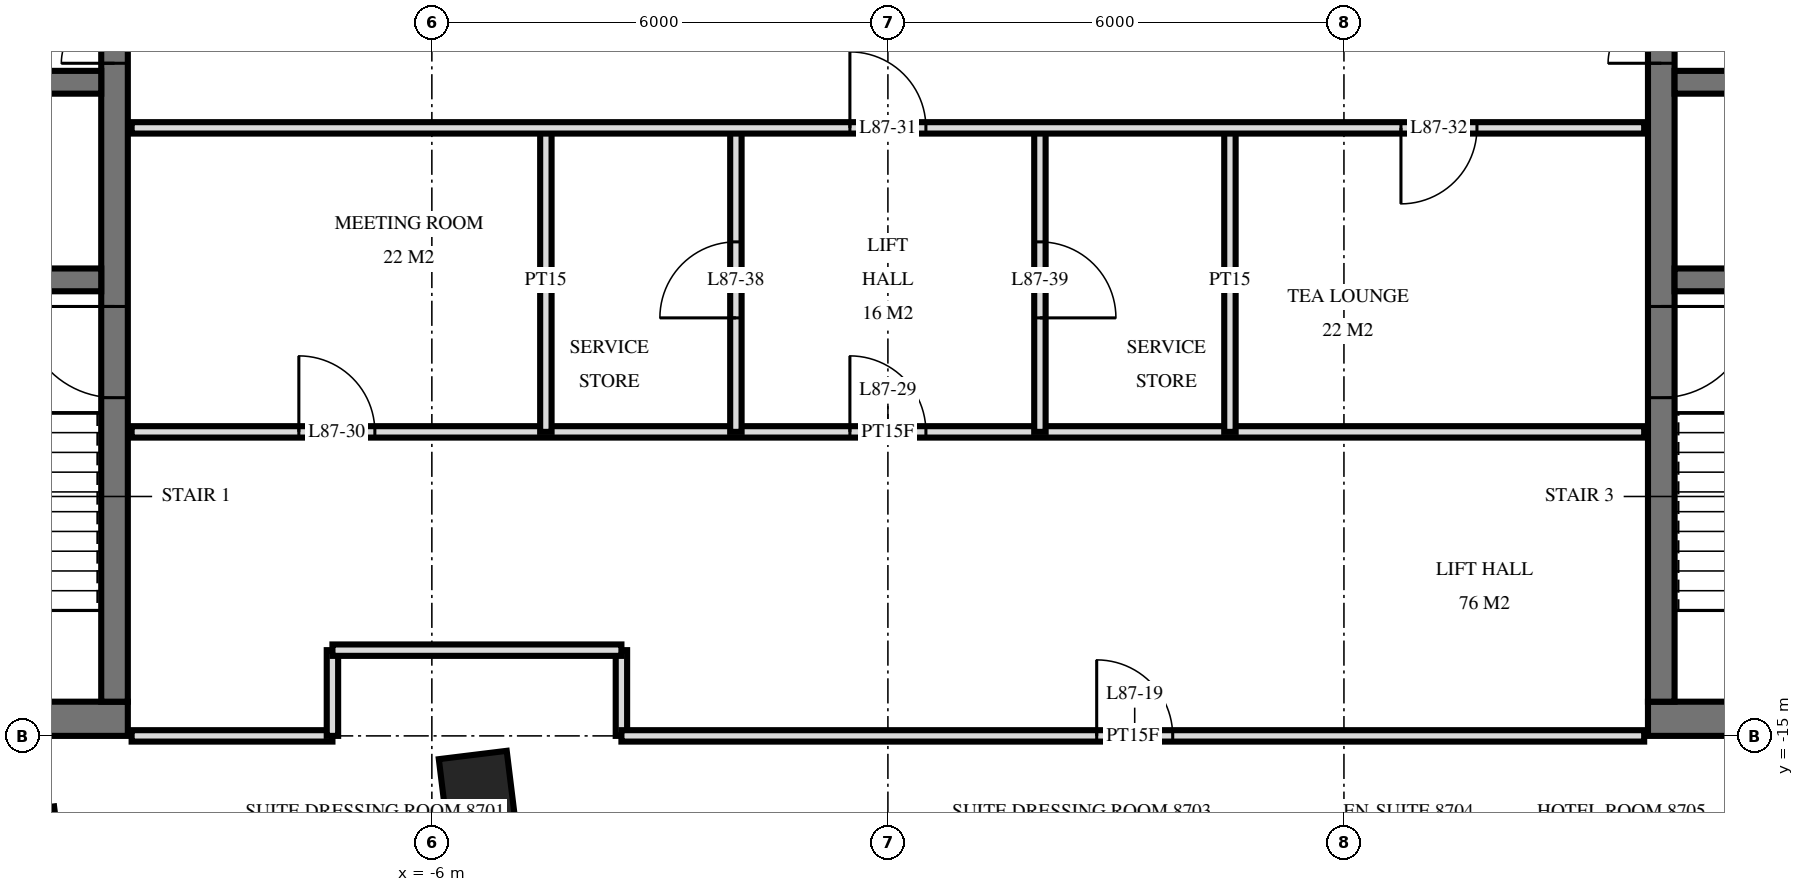
"""IFC4 building model, lengths in metres.
Left out: names, types, materials, properties, quantities, classifications, styles, units other than length and angle.
Written with IfcOpenShell. Run it as: python <this file> out.ifc"""

import sys

from ifc_helpers import new_model, si_unit, direction, frame, frame_2d, origin, origin_2d, place, context, subcontext, project, spatial, rectangle, extrude, element, fill, save


model = new_model("IFC4")
c1 = context("Model", 3, precision=1e-05, world=origin(), true_north=direction((0.0, 1.0)))
c2 = subcontext(c1, "Body", "Model", "MODEL_VIEW")
j1 = project(units=[si_unit("LENGTHUNIT", "METRE"), si_unit("PLANEANGLEUNIT", "RADIAN")], contexts=[c1])
p1 = place(None, origin())
s1 = spatial("IfcSite", under=j1, at=p1, CompositionType="ELEMENT")
p2 = place(p1, origin())
s2 = spatial("IfcBuilding", under=s1, at=p2, CompositionType="ELEMENT")
p3 = place(p2, frame((0.0, 0.0, 330.6)))
s3 = spatial("IfcBuildingStorey", under=s2, at=p3, CompositionType="ELEMENT", Elevation=330.6)
for number, where, z_axis, x_axis in (
    (1, (-11.362, -16.429, 0.0), (0.0, 0.0, 1.0), (0.993, 0.122, 0.0)),
    (2, (-5.407, -15.698, 0.0), (0.0, 0.0, 1.0), (0.993, 0.122, 0.0)),
):
    element("IfcColumn", number, at=place(p3, frame(where, z_axis=z_axis, x_axis=x_axis)), inside=s3, PredefinedType="COLUMN", context=c2, shape_type="SweptSolid", body=[
        extrude(rectangle(XDim=0.9, YDim=0.9, at=origin_2d()), origin(), (0.0, 0.0, 1.0), 4.0),
    ])
p4 = place(p3, frame((-19.5, -14.775, 0.0), z_axis=(0.0, 0.0, 1.0), x_axis=(1.0, 0.0, 0.0)))
e3 = element("IfcWall", 3, at=p4, inside=s3, PredefinedType="SHEAR", context=c2, shape_type="SweptSolid", body=[
    extrude(rectangle(XDim=9.5, YDim=0.45, at=frame_2d((4.75, 0.0))), origin(), (0.0, 0.0, 1.0), 4.0),
])
p5 = place(p4, frame((1.2, 0.0, 0.0)))
e4 = element("IfcOpeningElement", 4, at=p5, cuts=e3, PredefinedType="OPENING", context=c2, shape_type="SweptSolid", body=[
    extrude(rectangle(XDim=1.2, YDim=2.1, at=frame_2d((0.6, 1.05))), frame((0.0, 0.235, 0.0), z_axis=(0.0, -1.0, 0.0), x_axis=(1.0, 0.0, 0.0)), (0.0, 0.0, 1.0), 0.47),
])
p6 = place(p4, frame((4.25, 0.0, 0.0)))
e5 = element("IfcOpeningElement", 5, at=p6, cuts=e3, PredefinedType="OPENING", context=c2, shape_type="SweptSolid", body=[
    extrude(rectangle(XDim=1.1, YDim=2.1, at=frame_2d((0.55, 1.05))), frame((0.0, 0.235, 0.0), z_axis=(0.0, -1.0, 0.0), x_axis=(1.0, 0.0, 0.0)), (0.0, 0.0, 1.0), 0.47),
])
p7 = place(p3, frame((-10.175, -14.55, 0.0), z_axis=(0.0, 0.0, 1.0), x_axis=(0.0, 1.0, 0.0)))
e6 = element("IfcWall", 6, at=p7, inside=s3, PredefinedType="SHEAR", context=c2, shape_type="SweptSolid", body=[
    extrude(rectangle(XDim=14.1, YDim=0.35, at=frame_2d((7.05, 0.0))), origin(), (0.0, 0.0, 1.0), 4.0),
])
p8 = place(p7, frame((8.4, 0.0, 0.0)))
e7 = element("IfcOpeningElement", 7, at=p8, cuts=e6, PredefinedType="OPENING", context=c2, shape_type="SweptSolid", body=[
    extrude(rectangle(XDim=1.4, YDim=2.4, at=frame_2d((0.7, 1.2))), frame((0.0, 0.185, 0.0), z_axis=(0.0, -1.0, 0.0), x_axis=(1.0, 0.0, 0.0)), (0.0, 0.0, 1.0), 0.37),
])
p9 = place(p7, frame((10.0, 0.0, 0.0)))
e8 = element("IfcOpeningElement", 8, at=p9, cuts=e6, PredefinedType="OPENING", context=c2, shape_type="SweptSolid", body=[
    extrude(rectangle(XDim=1.4, YDim=2.4, at=frame_2d((0.7, 1.2))), frame((0.0, 0.185, 0.0), z_axis=(0.0, -1.0, 0.0), x_axis=(1.0, 0.0, 0.0)), (0.0, 0.0, 1.0), 0.37),
])
p10 = place(p7, frame((4.0, 0.0, 0.0)))
e9 = element("IfcOpeningElement", 9, at=p10, cuts=e6, PredefinedType="OPENING", context=c2, shape_type="SweptSolid", body=[
    extrude(rectangle(XDim=1.2, YDim=2.1, at=frame_2d((0.6, 1.05))), frame((0.0, 0.185, 0.0), z_axis=(0.0, -1.0, 0.0), x_axis=(1.0, 0.0, 0.0)), (0.0, 0.0, 1.0), 0.37),
])
p11 = place(p3, frame((-19.05, -6.4, 0.0), z_axis=(0.0, 0.0, 1.0), x_axis=(1.0, 0.0, 0.0)))
e10 = element("IfcWall", 10, at=p11, inside=s3, PredefinedType="SHEAR", context=c2, shape_type="SweptSolid", body=[
    extrude(rectangle(XDim=8.7, YDim=0.3, at=frame_2d((4.35, 0.0))), origin(), (0.0, 0.0, 1.0), 4.0),
])
p12 = place(p11, frame((0.8, 0.0, 0.0)))
e11 = element("IfcOpeningElement", 11, at=p12, cuts=e10, PredefinedType="OPENING", context=c2, shape_type="SweptSolid", body=[
    extrude(rectangle(XDim=1.1, YDim=2.1, at=frame_2d((0.55, 1.05))), frame((0.0, 0.16, 0.0), z_axis=(0.0, -1.0, 0.0), x_axis=(1.0, 0.0, 0.0)), (0.0, 0.0, 1.0), 0.32),
])
p13 = place(p3, frame((-19.05, -9.0, 0.0), z_axis=(0.0, 0.0, 1.0), x_axis=(1.0, 0.0, 0.0)))
e12 = element("IfcWall", 12, at=p13, inside=s3, PredefinedType="SHEAR", context=c2, shape_type="SweptSolid", body=[
    extrude(rectangle(XDim=8.7, YDim=0.3, at=frame_2d((4.35, 0.0))), origin(), (0.0, 0.0, 1.0), 4.0),
])
p14 = place(p13, frame((3.8, 0.0, 0.0)))
e13 = element("IfcOpeningElement", 13, at=p14, cuts=e12, PredefinedType="OPENING", context=c2, shape_type="SweptSolid", body=[
    extrude(rectangle(XDim=1.1, YDim=2.1, at=frame_2d((0.55, 1.05))), frame((0.0, 0.16, 0.0), z_axis=(0.0, -1.0, 0.0), x_axis=(1.0, 0.0, 0.0)), (0.0, 0.0, 1.0), 0.32),
])
p15 = place(p3, frame((10.0, -14.775, 0.0), z_axis=(0.0, 0.0, 1.0), x_axis=(1.0, 0.0, 0.0)))
e14 = element("IfcWall", 14, at=p15, inside=s3, PredefinedType="SHEAR", context=c2, shape_type="SweptSolid", body=[
    extrude(rectangle(XDim=9.5, YDim=0.45, at=frame_2d((4.75, 0.0))), origin(), (0.0, 0.0, 1.0), 4.0),
])
p16 = place(p15, frame((7.1, 0.0, 0.0)))
e15 = element("IfcOpeningElement", 15, at=p16, cuts=e14, PredefinedType="OPENING", context=c2, shape_type="SweptSolid", body=[
    extrude(rectangle(XDim=1.2, YDim=2.1, at=frame_2d((0.6, 1.05))), frame((0.0, 0.235, 0.0), z_axis=(0.0, -1.0, 0.0), x_axis=(1.0, 0.0, 0.0)), (0.0, 0.0, 1.0), 0.47),
])
p17 = place(p15, frame((4.15, 0.0, 0.0)))
e16 = element("IfcOpeningElement", 16, at=p17, cuts=e14, PredefinedType="OPENING", context=c2, shape_type="SweptSolid", body=[
    extrude(rectangle(XDim=1.1, YDim=2.1, at=frame_2d((0.55, 1.05))), frame((0.0, 0.235, 0.0), z_axis=(0.0, -1.0, 0.0), x_axis=(1.0, 0.0, 0.0)), (0.0, 0.0, 1.0), 0.47),
])
p18 = place(p3, frame((10.175, -14.55, 0.0), z_axis=(0.0, 0.0, 1.0), x_axis=(0.0, 1.0, 0.0)))
e17 = element("IfcWall", 17, at=p18, inside=s3, PredefinedType="SHEAR", context=c2, shape_type="SweptSolid", body=[
    extrude(rectangle(XDim=14.1, YDim=0.35, at=frame_2d((7.05, 0.0))), origin(), (0.0, 0.0, 1.0), 4.0),
])
p19 = place(p18, frame((8.4, 0.0, 0.0)))
e18 = element("IfcOpeningElement", 18, at=p19, cuts=e17, PredefinedType="OPENING", context=c2, shape_type="SweptSolid", body=[
    extrude(rectangle(XDim=1.4, YDim=2.4, at=frame_2d((0.7, 1.2))), frame((0.0, 0.185, 0.0), z_axis=(0.0, -1.0, 0.0), x_axis=(1.0, 0.0, 0.0)), (0.0, 0.0, 1.0), 0.37),
])
p20 = place(p18, frame((10.0, 0.0, 0.0)))
e19 = element("IfcOpeningElement", 19, at=p20, cuts=e17, PredefinedType="OPENING", context=c2, shape_type="SweptSolid", body=[
    extrude(rectangle(XDim=1.4, YDim=2.4, at=frame_2d((0.7, 1.2))), frame((0.0, 0.185, 0.0), z_axis=(0.0, -1.0, 0.0), x_axis=(1.0, 0.0, 0.0)), (0.0, 0.0, 1.0), 0.37),
])
p21 = place(p18, frame((4.0, 0.0, 0.0)))
e20 = element("IfcOpeningElement", 20, at=p21, cuts=e17, PredefinedType="OPENING", context=c2, shape_type="SweptSolid", body=[
    extrude(rectangle(XDim=1.2, YDim=2.1, at=frame_2d((0.6, 1.05))), frame((0.0, 0.185, 0.0), z_axis=(0.0, -1.0, 0.0), x_axis=(1.0, 0.0, 0.0)), (0.0, 0.0, 1.0), 0.37),
])
p22 = place(p3, frame((10.35, -6.4, 0.0), z_axis=(0.0, 0.0, 1.0), x_axis=(1.0, 0.0, 0.0)))
e21 = element("IfcWall", 21, at=p22, inside=s3, PredefinedType="SHEAR", context=c2, shape_type="SweptSolid", body=[
    extrude(rectangle(XDim=8.7, YDim=0.3, at=frame_2d((4.35, 0.0))), origin(), (0.0, 0.0, 1.0), 4.0),
])
p23 = place(p22, frame((6.8, 0.0, 0.0)))
e22 = element("IfcOpeningElement", 22, at=p23, cuts=e21, PredefinedType="OPENING", context=c2, shape_type="SweptSolid", body=[
    extrude(rectangle(XDim=1.1, YDim=2.1, at=frame_2d((0.55, 1.05))), frame((0.0, 0.16, 0.0), z_axis=(0.0, -1.0, 0.0), x_axis=(1.0, 0.0, 0.0)), (0.0, 0.0, 1.0), 0.32),
])
p24 = place(p3, frame((10.35, -9.0, 0.0), z_axis=(0.0, 0.0, 1.0), x_axis=(1.0, 0.0, 0.0)))
e23 = element("IfcWall", 23, at=p24, inside=s3, PredefinedType="SHEAR", context=c2, shape_type="SweptSolid", body=[
    extrude(rectangle(XDim=8.7, YDim=0.3, at=frame_2d((4.35, 0.0))), origin(), (0.0, 0.0, 1.0), 4.0),
])
p25 = place(p24, frame((3.8, 0.0, 0.0)))
e24 = element("IfcOpeningElement", 24, at=p25, cuts=e23, PredefinedType="OPENING", context=c2, shape_type="SweptSolid", body=[
    extrude(rectangle(XDim=1.1, YDim=2.1, at=frame_2d((0.55, 1.05))), frame((0.0, 0.16, 0.0), z_axis=(0.0, -1.0, 0.0), x_axis=(1.0, 0.0, 0.0)), (0.0, 0.0, 1.0), 0.32),
])
p26 = place(p3, frame((4.5, -11.0, 0.0), z_axis=(0.0, 0.0, 1.0), x_axis=(0.0, 1.0, 0.0)))
e25 = element("IfcWall", 25, at=p26, inside=s3, PredefinedType="PARTITIONING", context=c2, shape_type="SweptSolid", body=[
    extrude(rectangle(XDim=4.0, YDim=0.15, at=frame_2d((2.0, 0.0))), origin(), (0.0, 0.0, 1.0), 3.72),
])
p27 = place(p3, frame((2.0, -11.0, 0.0), z_axis=(0.0, 0.0, 1.0), x_axis=(0.0, 1.0, 0.0)))
e26 = element("IfcWall", 26, at=p27, inside=s3, PredefinedType="PARTITIONING", context=c2, shape_type="SweptSolid", body=[
    extrude(rectangle(XDim=4.0, YDim=0.15, at=frame_2d((2.0, 0.0))), origin(), (0.0, 0.0, 1.0), 3.72),
])
p28 = place(p27, frame((1.5, 0.0, 0.0)))
e27 = element("IfcOpeningElement", 27, at=p28, cuts=e26, PredefinedType="OPENING", context=c2, shape_type="SweptSolid", body=[
    extrude(rectangle(XDim=1.0, YDim=2.1, at=frame_2d((0.5, 1.05))), frame((0.0, 0.085, 0.0), z_axis=(0.0, -1.0, 0.0), x_axis=(1.0, 0.0, 0.0)), (0.0, 0.0, 1.0), 0.17),
])
p29 = place(p3, frame((-2.0, -11.0, 0.0), z_axis=(0.0, 0.0, 1.0), x_axis=(0.0, 1.0, 0.0)))
e28 = element("IfcWall", 28, at=p29, inside=s3, PredefinedType="PARTITIONING", context=c2, shape_type="SweptSolid", body=[
    extrude(rectangle(XDim=4.0, YDim=0.15, at=frame_2d((2.0, 0.0))), origin(), (0.0, 0.0, 1.0), 3.72),
])
p30 = place(p29, frame((1.5, 0.0, 0.0)))
e29 = element("IfcOpeningElement", 29, at=p30, cuts=e28, PredefinedType="OPENING", context=c2, shape_type="SweptSolid", body=[
    extrude(rectangle(XDim=1.0, YDim=2.1, at=frame_2d((0.5, 1.05))), frame((0.0, 0.085, 0.0), z_axis=(0.0, -1.0, 0.0), x_axis=(1.0, 0.0, 0.0)), (0.0, 0.0, 1.0), 0.17),
])
p31 = place(p3, frame((-3.506, -15.0, 0.0), z_axis=(0.0, 0.0, 1.0), x_axis=(0.0, 1.0, 0.0)))
e30 = element("IfcWall", 30, at=p31, inside=s3, PredefinedType="PARTITIONING", context=c2, shape_type="SweptSolid", body=[
    extrude(rectangle(XDim=1.128, YDim=0.15, at=frame_2d((0.564, 0.0))), origin(), (0.0, 0.0, 1.0), 3.72),
])
p32 = place(p3, frame((-4.5, -11.0, 0.0), z_axis=(0.0, 0.0, 1.0), x_axis=(0.0, 1.0, 0.0)))
e31 = element("IfcWall", 31, at=p32, inside=s3, PredefinedType="PARTITIONING", context=c2, shape_type="SweptSolid", body=[
    extrude(rectangle(XDim=4.0, YDim=0.15, at=frame_2d((2.0, 0.0))), origin(), (0.0, 0.0, 1.0), 3.72),
])
p33 = place(p3, frame((-7.308, -15.0, 0.0), z_axis=(0.0, 0.0, 1.0), x_axis=(0.0, 1.0, 0.0)))
e32 = element("IfcWall", 32, at=p33, inside=s3, PredefinedType="PARTITIONING", context=c2, shape_type="SweptSolid", body=[
    extrude(rectangle(XDim=1.128, YDim=0.15, at=frame_2d((0.564, 0.0))), origin(), (0.0, 0.0, 1.0), 3.72),
])
p34 = place(p3, frame((-9.95, -15.0, 0.0), z_axis=(0.0, 0.0, 1.0), x_axis=(1.0, 0.0, 0.0)))
e33 = element("IfcWall", 33, at=p34, inside=s3, PredefinedType="PARTITIONING", context=c2, shape_type="SweptSolid", body=[
    extrude(rectangle(XDim=2.642, YDim=0.15, at=frame_2d((1.321, 0.0))), origin(), (0.0, 0.0, 1.0), 3.084),
])
p35 = place(p3, frame((-3.506, -15.0, 0.0), z_axis=(0.0, 0.0, 1.0), x_axis=(1.0, 0.0, 0.0)))
e34 = element("IfcWall", 34, at=p35, inside=s3, PredefinedType="PARTITIONING", context=c2, shape_type="SweptSolid", body=[
    extrude(rectangle(XDim=13.456, YDim=0.15, at=frame_2d((6.728, 0.0))), origin(), (0.0, 0.0, 1.0), 3.084),
])
p36 = place(p35, frame((6.253, 0.0, 0.0)))
e35 = element("IfcOpeningElement", 35, at=p36, cuts=e34, PredefinedType="OPENING", context=c2, shape_type="SweptSolid", body=[
    extrude(rectangle(XDim=1.0, YDim=2.1, at=frame_2d((0.5, 1.05))), frame((0.0, 0.085, 0.0), z_axis=(0.0, -1.0, 0.0), x_axis=(1.0, 0.0, 0.0)), (0.0, 0.0, 1.0), 0.17),
])
p37 = place(p3, frame((-7.308, -13.872, 0.0), z_axis=(0.0, 0.0, 1.0), x_axis=(1.0, 0.0, 0.0)))
e36 = element("IfcWall", 36, at=p37, inside=s3, PredefinedType="PARTITIONING", context=c2, shape_type="SweptSolid", body=[
    extrude(rectangle(XDim=3.802, YDim=0.15, at=frame_2d((1.901, 0.0))), origin(), (0.0, 0.0, 1.0), 3.72),
])
p38 = place(p3, frame((-9.95, -11.0, 0.0), z_axis=(0.0, 0.0, 1.0), x_axis=(1.0, 0.0, 0.0)))
e37 = element("IfcWall", 37, at=p38, inside=s3, PredefinedType="PARTITIONING", context=c2, shape_type="SweptSolid", body=[
    extrude(rectangle(XDim=19.9, YDim=0.15, at=frame_2d((9.95, 0.0))), origin(), (0.0, 0.0, 1.0), 3.72),
])
p39 = place(p38, frame((9.45, 0.0, 0.0)))
e38 = element("IfcOpeningElement", 38, at=p39, cuts=e37, PredefinedType="OPENING", context=c2, shape_type="SweptSolid", body=[
    extrude(rectangle(XDim=1.0, YDim=2.1, at=frame_2d((0.5, 1.05))), frame((0.0, 0.085, 0.0), z_axis=(0.0, -1.0, 0.0), x_axis=(1.0, 0.0, 0.0)), (0.0, 0.0, 1.0), 0.17),
])
p40 = place(p38, frame((2.2, 0.0, 0.0)))
e39 = element("IfcOpeningElement", 39, at=p40, cuts=e37, PredefinedType="OPENING", context=c2, shape_type="SweptSolid", body=[
    extrude(rectangle(XDim=1.0, YDim=2.1, at=frame_2d((0.5, 1.05))), frame((0.0, 0.085, 0.0), z_axis=(0.0, -1.0, 0.0), x_axis=(1.0, 0.0, 0.0)), (0.0, 0.0, 1.0), 0.17),
])
p41 = place(p3, frame((-9.95, -7.0, 0.0), z_axis=(0.0, 0.0, 1.0), x_axis=(1.0, 0.0, 0.0)))
e40 = element("IfcWall", 40, at=p41, inside=s3, PredefinedType="PARTITIONING", context=c2, shape_type="SweptSolid", body=[
    extrude(rectangle(XDim=19.9, YDim=0.15, at=frame_2d((9.95, 0.0))), origin(), (0.0, 0.0, 1.0), 3.72),
])
p42 = place(p41, frame((9.45, 0.0, 0.0)))
e41 = element("IfcOpeningElement", 41, at=p42, cuts=e40, PredefinedType="OPENING", context=c2, shape_type="SweptSolid", body=[
    extrude(rectangle(XDim=1.0, YDim=2.1, at=frame_2d((0.5, 1.05))), frame((0.0, 0.085, 0.0), z_axis=(0.0, -1.0, 0.0), x_axis=(1.0, 0.0, 0.0)), (0.0, 0.0, 1.0), 0.17),
])
p43 = place(p41, frame((16.7, 0.0, 0.0)))
e42 = element("IfcOpeningElement", 42, at=p43, cuts=e40, PredefinedType="OPENING", context=c2, shape_type="SweptSolid", body=[
    extrude(rectangle(XDim=1.0, YDim=2.1, at=frame_2d((0.5, 1.05))), frame((0.0, 0.085, 0.0), z_axis=(0.0, -1.0, 0.0), x_axis=(1.0, 0.0, 0.0)), (0.0, 0.0, 1.0), 0.17),
])
p44 = place(p8, origin())
e43 = element("IfcDoor", 43, at=p44, inside=s3, OperationType="DOUBLE_DOOR_SINGLE_SWING", PredefinedType="DOOR", context=c2, shape_type="SweptSolid", body=[
    extrude(rectangle(XDim=1.4, YDim=2.4, at=frame_2d((0.7, 1.2))), frame((0.0, 0.025, 0.0), z_axis=(0.0, -1.0, 0.0), x_axis=(1.0, 0.0, 0.0)), (0.0, 0.0, 1.0), 0.05),
])
fill(e7, e43)
p45 = place(p10, origin())
e44 = element("IfcDoor", 44, at=p45, inside=s3, OperationType="SINGLE_SWING_LEFT", PredefinedType="DOOR", context=c2, shape_type="SweptSolid", body=[
    extrude(rectangle(XDim=1.2, YDim=2.1, at=frame_2d((0.6, 1.05))), frame((0.0, 0.025, 0.0), z_axis=(0.0, -1.0, 0.0), x_axis=(1.0, 0.0, 0.0)), (0.0, 0.0, 1.0), 0.05),
])
fill(e9, e44)
p46 = place(p19, origin())
e45 = element("IfcDoor", 45, at=p46, inside=s3, OperationType="DOUBLE_DOOR_SINGLE_SWING", PredefinedType="DOOR", context=c2, shape_type="SweptSolid", body=[
    extrude(rectangle(XDim=1.4, YDim=2.4, at=frame_2d((0.7, 1.2))), frame((0.0, 0.025, 0.0), z_axis=(0.0, -1.0, 0.0), x_axis=(1.0, 0.0, 0.0)), (0.0, 0.0, 1.0), 0.05),
])
fill(e18, e45)
p47 = place(p21, frame((0.6, 0.0, 0.0), z_axis=(0.0, 0.0, 1.0), x_axis=(-1.0, 0.0, 0.0)))
e46 = element("IfcDoor", 46, at=p47, inside=s3, OperationType="SINGLE_SWING_RIGHT", PredefinedType="DOOR", context=c2, shape_type="SweptSolid", body=[
    extrude(rectangle(XDim=1.2, YDim=2.1, at=frame_2d((0.0, 1.05))), frame((0.0, -0.025, 0.0), z_axis=(0.0, 1.0, 0.0), x_axis=(-1.0, 0.0, 0.0)), (0.0, 0.0, 1.0), 0.05),
])
fill(e20, e46)
p48 = place(p36, origin())
e47 = element("IfcDoor", 47, at=p48, inside=s3, OperationType="SINGLE_SWING_RIGHT", PredefinedType="DOOR", context=c2, shape_type="SweptSolid", body=[
    extrude(rectangle(XDim=1.0, YDim=2.1, at=frame_2d((0.5, 1.05))), frame((0.0, 0.025, 0.0), z_axis=(0.0, -1.0, 0.0), x_axis=(1.0, 0.0, 0.0)), (0.0, 0.0, 1.0), 0.05),
])
fill(e35, e47)
p49 = place(p39, origin())
e48 = element("IfcDoor", 48, at=p49, inside=s3, OperationType="SINGLE_SWING_RIGHT", PredefinedType="DOOR", context=c2, shape_type="SweptSolid", body=[
    extrude(rectangle(XDim=1.0, YDim=2.1, at=frame_2d((0.5, 1.05))), frame((0.0, 0.025, 0.0), z_axis=(0.0, -1.0, 0.0), x_axis=(1.0, 0.0, 0.0)), (0.0, 0.0, 1.0), 0.05),
])
fill(e38, e48)
p50 = place(p40, origin())
e49 = element("IfcDoor", 49, at=p50, inside=s3, OperationType="SINGLE_SWING_RIGHT", PredefinedType="DOOR", context=c2, shape_type="SweptSolid", body=[
    extrude(rectangle(XDim=1.0, YDim=2.1, at=frame_2d((0.5, 1.05))), frame((0.0, 0.025, 0.0), z_axis=(0.0, -1.0, 0.0), x_axis=(1.0, 0.0, 0.0)), (0.0, 0.0, 1.0), 0.05),
])
fill(e39, e49)
p51 = place(p42, origin())
e50 = element("IfcDoor", 50, at=p51, inside=s3, OperationType="SINGLE_SWING_RIGHT", PredefinedType="DOOR", context=c2, shape_type="SweptSolid", body=[
    extrude(rectangle(XDim=1.0, YDim=2.1, at=frame_2d((0.5, 1.05))), frame((0.0, 0.025, 0.0), z_axis=(0.0, -1.0, 0.0), x_axis=(1.0, 0.0, 0.0)), (0.0, 0.0, 1.0), 0.05),
])
fill(e41, e50)
p52 = place(p43, frame((0.5, 0.0, 0.0), z_axis=(0.0, 0.0, 1.0), x_axis=(-1.0, 0.0, 0.0)))
e51 = element("IfcDoor", 51, at=p52, inside=s3, OperationType="SINGLE_SWING_LEFT", PredefinedType="DOOR", context=c2, shape_type="SweptSolid", body=[
    extrude(rectangle(XDim=1.0, YDim=2.1, at=frame_2d((0.0, 1.05))), frame((0.0, -0.025, 0.0), z_axis=(0.0, 1.0, 0.0), x_axis=(-1.0, 0.0, 0.0)), (0.0, 0.0, 1.0), 0.05),
])
fill(e42, e51)
p53 = place(p30, origin())
e52 = element("IfcDoor", 52, at=p53, inside=s3, OperationType="SINGLE_SWING_RIGHT", PredefinedType="DOOR", context=c2, shape_type="SweptSolid", body=[
    extrude(rectangle(XDim=1.0, YDim=2.1, at=frame_2d((0.5, 1.05))), frame((0.0, 0.025, 0.0), z_axis=(0.0, -1.0, 0.0), x_axis=(1.0, 0.0, 0.0)), (0.0, 0.0, 1.0), 0.05),
])
fill(e29, e52)
p54 = place(p28, frame((0.5, 0.0, 0.0), z_axis=(0.0, 0.0, 1.0), x_axis=(-1.0, 0.0, 0.0)))
e53 = element("IfcDoor", 53, at=p54, inside=s3, OperationType="SINGLE_SWING_LEFT", PredefinedType="DOOR", context=c2, shape_type="SweptSolid", body=[
    extrude(rectangle(XDim=1.0, YDim=2.1, at=frame_2d((0.0, 1.05))), frame((0.0, -0.025, 0.0), z_axis=(0.0, 1.0, 0.0), x_axis=(-1.0, 0.0, 0.0)), (0.0, 0.0, 1.0), 0.05),
])
fill(e27, e53)
save(model, sys.argv[1])
